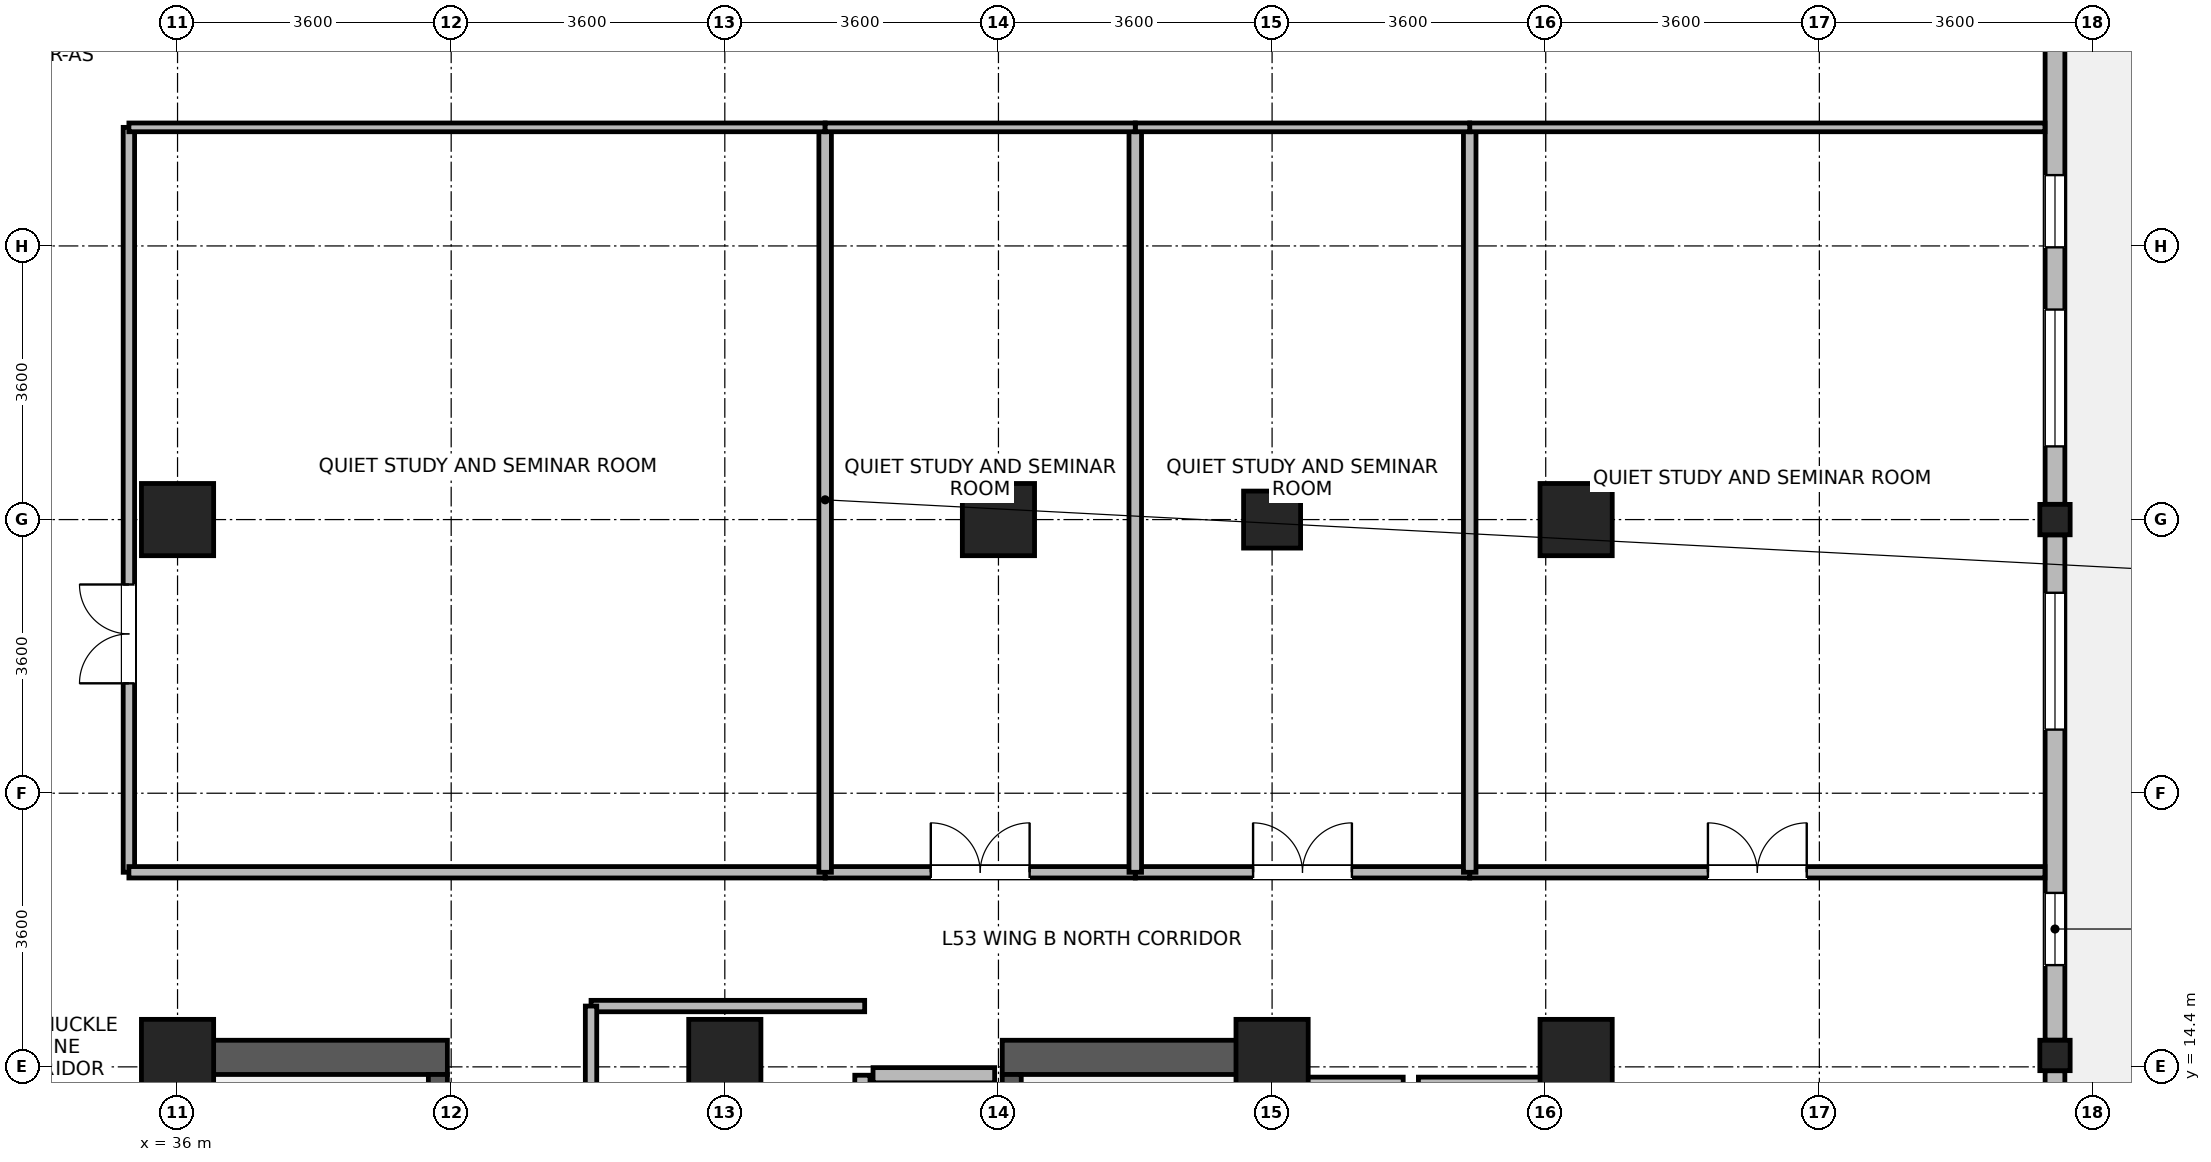
"""IFC4 building model, lengths in metres.
Left out: names, types, materials, properties, quantities, classifications, styles, units other than length and angle.
Written with IfcOpenShell. Run it as: python <this file> out.ifc"""

import sys

from ifc_helpers import new_model, si_unit, direction, frame, frame_2d, origin, origin_2d, place, context, subcontext, project, spatial, rectangle, i_section, extrude, source, transform, mapped, element, fill, save


model = new_model("IFC4")
c1 = context("Model", 3, precision=1e-05, world=origin(), true_north=direction((0.0, 1.0)))
c2 = subcontext(c1, "Body", "Model", "MODEL_VIEW")
j1 = project(units=[si_unit("LENGTHUNIT", "METRE"), si_unit("PLANEANGLEUNIT", "RADIAN")], contexts=[c1])
p1 = place(None, origin())
s1 = spatial("IfcSite", under=j1, at=p1, CompositionType="ELEMENT")
p2 = place(p1, origin())
s2 = spatial("IfcBuilding", under=s1, at=p2, CompositionType="ELEMENT")
p3 = place(p2, frame((0.0, 0.0, 209.2)))
s3 = spatial("IfcBuildingStorey", under=s2, at=p3, CompositionType="ELEMENT", Elevation=209.2)
for number, where, z_axis, x_axis in (
    (1, (36.125, 6.85, 0.0), (0.0, 0.0, 1.0), (0.0, 1.0, 0.0)),
    (2, (50.275, 6.85, 0.0), (0.0, 0.0, 1.0), (0.0, 1.0, 0.0)),
):
    element("IfcWall", number, at=place(p3, frame(where, z_axis=z_axis, x_axis=x_axis)), inside=s3, PredefinedType="SHEAR", context=c2, shape_type="SweptSolid", body=[
        extrude(rectangle(XDim=7.9, YDim=0.45, at=frame_2d((3.95, 0.0))), origin(), (0.0, 0.0, 1.0), 3.47),
    ])
for number, where, z_axis, x_axis in (
    (3, (36.35, 14.525, 0.0), (0.0, 0.0, 1.0), (1.0, 0.0, 0.0)),
    (4, (46.85, 14.525, 0.0), (0.0, 0.0, 1.0), (1.0, 0.0, 0.0)),
):
    element("IfcWall", number, at=place(p3, frame(where, z_axis=z_axis, x_axis=x_axis)), inside=s3, PredefinedType="SHEAR", context=c2, shape_type="SweptSolid", body=[
        extrude(rectangle(XDim=3.2, YDim=0.45, at=frame_2d((1.6, 0.0))), origin(), (0.0, 0.0, 1.0), 3.47),
    ])
p4 = place(p3, frame((39.425, 7.3, 0.0), z_axis=(0.0, 0.0, 1.0), x_axis=(0.0, 1.0, 0.0)))
e5 = element("IfcWall", 5, at=p4, inside=s3, PredefinedType="SHEAR", context=c2, shape_type="SweptSolid", body=[
    extrude(rectangle(XDim=7.0, YDim=0.25, at=frame_2d((3.5, 0.0))), origin(), (0.0, 0.0, 1.0), 3.47),
])
p5 = place(p4, frame((0.15, 0.0, 0.0)))
e6 = element("IfcOpeningElement", 6, at=p5, cuts=e5, PredefinedType="OPENING", context=c2, shape_type="SweptSolid", body=[
    extrude(rectangle(XDim=1.1, YDim=2.08, at=frame_2d((0.55, 1.04))), frame((0.0, 0.135, 0.0), z_axis=(0.0, -1.0, 0.0), x_axis=(1.0, 0.0, 0.0)), (0.0, 0.0, 1.0), 0.27),
])
p6 = place(p3, frame((46.975, 7.3, 0.0), z_axis=(0.0, 0.0, 1.0), x_axis=(0.0, 1.0, 0.0)))
e7 = element("IfcWall", 7, at=p6, inside=s3, PredefinedType="SHEAR", context=c2, shape_type="SweptSolid", body=[
    extrude(rectangle(XDim=7.0, YDim=0.25, at=frame_2d((3.5, 0.0))), origin(), (0.0, 0.0, 1.0), 3.47),
])
p7 = place(p6, frame((0.15, 0.0, 0.0)))
e8 = element("IfcOpeningElement", 8, at=p7, cuts=e7, PredefinedType="OPENING", context=c2, shape_type="SweptSolid", body=[
    extrude(rectangle(XDim=1.1, YDim=2.08, at=frame_2d((0.55, 1.04))), frame((0.0, 0.135, 0.0), z_axis=(0.0, -1.0, 0.0), x_axis=(1.0, 0.0, 0.0)), (0.0, 0.0, 1.0), 0.27),
])
m1 = source(origin(), c2, "Body", "SweptSolid", [
    extrude(rectangle(XDim=0.95, YDim=0.95, at=origin_2d()), origin(), (0.0, 0.0, 1.0), 3.7),
])
for number, where, z_axis, x_axis in (
    (9, (36.0, 21.6, 0.0), (0.0, 0.0, 1.0), (1.0, 0.0, 0.0)),
    (10, (46.8, 21.6, 0.0), (0.0, 0.0, 1.0), (1.0, 0.0, 0.0)),
    (11, (36.0, 14.55, 0.0), (0.0, 0.0, 1.0), (1.0, 0.0, 0.0)),
    (12, (43.2, 14.55, 0.0), (0.0, 0.0, 1.0), (1.0, 0.0, 0.0)),
    (13, (50.4, 14.55, 0.0), (0.0, 0.0, 1.0), (1.0, 0.0, 0.0)),
):
    element("IfcColumn", number, at=place(p3, frame(where, z_axis=z_axis, x_axis=x_axis)), inside=s3, PredefinedType="COLUMN", context=c2, shape_type="MappedRepresentation", body=[
        mapped(m1, transform((0.0, 0.0, 0.0), x_axis=(1.0, 0.0, 0.0), y_axis=(0.0, 1.0, 0.0), z_axis=(0.0, 0.0, 1.0), scale=1.0)),
    ])
m2 = source(origin(), c2, "Body", "SweptSolid", [
    extrude(rectangle(XDim=0.75, YDim=0.75, at=origin_2d()), origin(), (0.0, 0.0, 1.0), 3.7),
])
p8 = place(p3, frame((50.4, 21.6, 0.0), z_axis=(0.0, 0.0, 1.0), x_axis=(1.0, 0.0, 0.0)))
e14 = element("IfcColumn", 14, at=p8, inside=s3, PredefinedType="PILASTER", context=c2, shape_type="MappedRepresentation", body=[
    mapped(m2, transform((0.0, 0.0, 0.0), x_axis=(1.0, 0.0, 0.0), y_axis=(0.0, 1.0, 0.0), z_axis=(0.0, 0.0, 1.0), scale=1.0)),
])
for number, where, z_axis, x_axis in (
    (15, (54.4, 14.55, 0.0), (0.0, 0.0, 1.0), (1.0, 0.0, 0.0)),
    (16, (54.4, 21.6, 0.0), (0.0, 0.0, 1.0), (1.0, 0.0, 0.0)),
):
    element("IfcColumn", number, at=place(p3, frame(where, z_axis=z_axis, x_axis=x_axis)), inside=s3, PredefinedType="COLUMN", context=c2, shape_type="MappedRepresentation", body=[
        mapped(m1, transform((0.0, 0.0, 0.0), x_axis=(1.0, 0.0, 0.0), y_axis=(0.0, 1.0, 0.0), z_axis=(0.0, 0.0, 1.0), scale=1.0)),
    ])
m3 = source(origin(), c2, "Body", "SweptSolid", [
    extrude(i_section(OverallWidth=0.399, OverallDepth=0.4, WebThickness=0.017, FlangeThickness=0.023, FilletRadius=0.015, at=origin_2d()), origin(), (0.0, 0.0, 1.0), 3.7),
])
for number, where, z_axis, x_axis in (
    (17, (60.7, 14.55, 0.0), (0.0, 0.0, 1.0), (1.0, 0.0, 0.0)),
    (18, (60.7, 21.6, 0.0), (0.0, 0.0, 1.0), (1.0, 0.0, 0.0)),
):
    element("IfcColumn", number, at=place(p3, frame(where, z_axis=z_axis, x_axis=x_axis)), inside=s3, PredefinedType="COLUMN", context=c2, shape_type="MappedRepresentation", body=[
        mapped(m3, transform((0.0, 0.0, 0.0), x_axis=(1.0, 0.0, 0.0), y_axis=(0.0, 1.0, 0.0), z_axis=(0.0, 0.0, 1.0), scale=1.0)),
    ])
p9 = place(p3, frame((60.7, 14.349, 0.0), z_axis=(0.0, 0.0, 1.0), x_axis=(0.0, -1.0, 0.0)))
e19 = element("IfcWall", 19, at=p9, inside=s3, PredefinedType="STANDARD", context=c2, shape_type="SweptSolid", body=[
    extrude(rectangle(XDim=7.098, YDim=0.26, at=frame_2d((3.549, 0.0))), origin(), (0.0, 0.0, 1.0), 3.0),
])
p10 = place(p9, frame((2.799, 0.0, 0.0)))
e20 = element("IfcOpeningElement", 20, at=p10, cuts=e19, PredefinedType="OPENING", context=c2, shape_type="SweptSolid", body=[
    extrude(rectangle(XDim=1.5, YDim=2.15, at=frame_2d((0.75, 1.075))), frame((0.0, 0.14, 0.0), z_axis=(0.0, -1.0, 0.0), x_axis=(1.0, 0.0, 0.0)), (0.0, 0.0, 1.0), 0.28),
])
p11 = place(p3, frame((60.7, 21.399, 0.0), z_axis=(0.0, 0.0, 1.0), x_axis=(0.0, -1.0, 0.0)))
e21 = element("IfcWall", 21, at=p11, inside=s3, PredefinedType="STANDARD", context=c2, shape_type="SweptSolid", body=[
    extrude(rectangle(XDim=6.648, YDim=0.26, at=frame_2d((3.324, 0.0))), origin(), (0.0, 0.0, 1.0), 3.0),
])
p12 = place(p11, frame((0.762, 0.0, 0.85)))
e22 = element("IfcOpeningElement", 22, at=p12, cuts=e21, PredefinedType="OPENING", context=c2, shape_type="SweptSolid", body=[
    extrude(rectangle(XDim=1.8, YDim=1.85, at=frame_2d((0.9, 0.925))), frame((0.0, 0.14, 0.0), z_axis=(0.0, -1.0, 0.0), x_axis=(1.0, 0.0, 0.0)), (0.0, 0.0, 1.0), 0.28),
])
p13 = place(p11, frame((4.71, 0.0, 0.85)))
e23 = element("IfcOpeningElement", 23, at=p13, cuts=e21, PredefinedType="OPENING", context=c2, shape_type="SweptSolid", body=[
    extrude(rectangle(XDim=0.95, YDim=1.75, at=frame_2d((0.475, 0.875))), frame((0.0, 0.14, 0.0), z_axis=(0.0, -1.0, 0.0), x_axis=(1.0, 0.0, 0.0)), (0.0, 0.0, 1.0), 0.28),
])
p14 = place(p3, frame((60.7, 28.449, 0.0), z_axis=(0.0, 0.0, 1.0), x_axis=(0.0, -1.0, 0.0)))
e24 = element("IfcWall", 24, at=p14, inside=s3, PredefinedType="STANDARD", context=c2, shape_type="SweptSolid", body=[
    extrude(rectangle(XDim=6.648, YDim=0.26, at=frame_2d((3.324, 0.0))), origin(), (0.0, 0.0, 1.0), 3.0),
])
p15 = place(p14, frame((4.086, 0.0, 0.85)))
e25 = element("IfcOpeningElement", 25, at=p15, cuts=e24, PredefinedType="OPENING", context=c2, shape_type="SweptSolid", body=[
    extrude(rectangle(XDim=1.8, YDim=1.85, at=frame_2d((0.9, 0.925))), frame((0.0, 0.14, 0.0), z_axis=(0.0, -1.0, 0.0), x_axis=(1.0, 0.0, 0.0)), (0.0, 0.0, 1.0), 0.28),
])
p16 = place(p14, frame((2.317, 0.0, 0.85)))
e26 = element("IfcOpeningElement", 26, at=p16, cuts=e24, PredefinedType="OPENING", context=c2, shape_type="SweptSolid", body=[
    extrude(rectangle(XDim=0.95, YDim=1.75, at=frame_2d((0.475, 0.875))), frame((0.0, 0.14, 0.0), z_axis=(0.0, -1.0, 0.0), x_axis=(1.0, 0.0, 0.0)), (0.0, 0.0, 1.0), 0.28),
])
p17 = place(p3, frame((50.475, 14.165, 0.0), z_axis=(0.0, 0.0, 1.0), x_axis=(1.0, 0.0, 0.0)))
e27 = element("IfcWall", 27, at=p17, inside=s3, PredefinedType="PARTITIONING", context=c2, shape_type="SweptSolid", body=[
    extrude(rectangle(XDim=1.65, YDim=0.2, at=frame_2d((0.825, 0.0))), origin(), (0.0, 0.0, 1.0), 3.45),
])
p18 = place(p3, frame((52.325, 14.165, 0.0), z_axis=(0.0, 0.0, 1.0), x_axis=(1.0, 0.0, 0.0)))
e28 = element("IfcWall", 28, at=p18, inside=s3, PredefinedType="PARTITIONING", context=c2, shape_type="SweptSolid", body=[
    extrude(rectangle(XDim=1.65, YDim=0.2, at=frame_2d((0.825, 0.0))), origin(), (0.0, 0.0, 1.0), 3.45),
])
p19 = place(p3, frame((45.15, 14.29, 0.0), z_axis=(0.0, 0.0, 1.0), x_axis=(1.0, 0.0, 0.0)))
e29 = element("IfcWall", 29, at=p19, inside=s3, PredefinedType="PARTITIONING", context=c2, shape_type="SweptSolid", body=[
    extrude(rectangle(XDim=1.6, YDim=0.2, at=frame_2d((0.8, 0.0))), origin(), (0.0, 0.0, 1.0), 2.45),
])
p20 = place(p3, frame((45.01, 11.61, 0.0), z_axis=(0.0, 0.0, 1.0), x_axis=(0.0, 1.0, 0.0)))
e30 = element("IfcWall", 30, at=p20, inside=s3, PredefinedType="PARTITIONING", context=c2, shape_type="SweptSolid", body=[
    extrude(rectangle(XDim=2.68, YDim=0.2, at=frame_2d((1.34, 0.0))), origin(), (0.0, 0.0, 1.0), 3.45),
])
p21 = place(p3, frame((35.36, 16.96, 0.0), z_axis=(0.0, 0.0, 1.0), x_axis=(0.0, 1.0, 0.0)))
e31 = element("IfcWall", 31, at=p21, inside=s3, PredefinedType="PARTITIONING", context=c2, shape_type="SweptSolid", body=[
    extrude(rectangle(XDim=9.8, YDim=0.15, at=frame_2d((4.9, 0.0))), origin(), (0.0, 0.0, 1.0), 3.45),
])
p22 = place(p21, frame((2.486, 0.0, 0.0)))
e32 = element("IfcOpeningElement", 32, at=p22, cuts=e31, PredefinedType="OPENING", context=c2, shape_type="SweptSolid", body=[
    extrude(rectangle(XDim=1.3, YDim=2.12, at=frame_2d((0.65, 1.06))), frame((0.0, 0.085, 0.0), z_axis=(0.0, -1.0, 0.0), x_axis=(1.0, 0.0, 0.0)), (0.0, 0.0, 1.0), 0.17),
])
p23 = place(p3, frame((35.36, 16.96, 0.0), z_axis=(0.0, 0.0, 1.0), x_axis=(1.0, 0.0, 0.0)))
e33 = element("IfcWall", 33, at=p23, inside=s3, PredefinedType="PARTITIONING", context=c2, shape_type="SweptSolid", body=[
    extrude(rectangle(XDim=9.16, YDim=0.15, at=frame_2d((4.58, 0.0))), origin(), (0.0, 0.0, 1.0), 3.45),
])
p24 = place(p3, frame((53.0, 16.96, 0.0), z_axis=(0.0, 0.0, 1.0), x_axis=(1.0, 0.0, 0.0)))
e34 = element("IfcWall", 34, at=p24, inside=s3, PredefinedType="PARTITIONING", context=c2, shape_type="SweptSolid", body=[
    extrude(rectangle(XDim=7.568, YDim=0.15, at=frame_2d((3.784, 0.0))), origin(), (0.0, 0.0, 1.0), 3.45),
])
p25 = place(p24, frame((3.134, 0.0, 0.0)))
e35 = element("IfcOpeningElement", 35, at=p25, cuts=e34, PredefinedType="OPENING", context=c2, shape_type="SweptSolid", body=[
    extrude(rectangle(XDim=1.3, YDim=2.12, at=frame_2d((0.65, 1.06))), frame((0.0, 0.085, 0.0), z_axis=(0.0, -1.0, 0.0), x_axis=(1.0, 0.0, 0.0)), (0.0, 0.0, 1.0), 0.17),
])
p26 = place(p3, frame((48.6, 16.96, 0.0), z_axis=(0.0, 0.0, 1.0), x_axis=(1.0, 0.0, 0.0)))
e36 = element("IfcWall", 36, at=p26, inside=s3, PredefinedType="PARTITIONING", context=c2, shape_type="SweptSolid", body=[
    extrude(rectangle(XDim=4.4, YDim=0.15, at=frame_2d((2.2, 0.0))), origin(), (0.0, 0.0, 1.0), 3.45),
])
p27 = place(p26, frame((1.55, 0.0, 0.0)))
e37 = element("IfcOpeningElement", 37, at=p27, cuts=e36, PredefinedType="OPENING", context=c2, shape_type="SweptSolid", body=[
    extrude(rectangle(XDim=1.3, YDim=2.12, at=frame_2d((0.65, 1.06))), frame((0.0, 0.085, 0.0), z_axis=(0.0, -1.0, 0.0), x_axis=(1.0, 0.0, 0.0)), (0.0, 0.0, 1.0), 0.17),
])
p28 = place(p3, frame((44.52, 16.96, 0.0), z_axis=(0.0, 0.0, 1.0), x_axis=(1.0, 0.0, 0.0)))
e38 = element("IfcWall", 38, at=p28, inside=s3, PredefinedType="PARTITIONING", context=c2, shape_type="SweptSolid", body=[
    extrude(rectangle(XDim=4.08, YDim=0.15, at=frame_2d((2.04, 0.0))), origin(), (0.0, 0.0, 1.0), 3.45),
])
p29 = place(p28, frame((1.39, 0.0, 0.0)))
e39 = element("IfcOpeningElement", 39, at=p29, cuts=e38, PredefinedType="OPENING", context=c2, shape_type="SweptSolid", body=[
    extrude(rectangle(XDim=1.3, YDim=2.12, at=frame_2d((0.65, 1.06))), frame((0.0, 0.085, 0.0), z_axis=(0.0, -1.0, 0.0), x_axis=(1.0, 0.0, 0.0)), (0.0, 0.0, 1.0), 0.17),
])
p30 = place(p3, frame((41.44, 15.2, 0.0), z_axis=(0.0, 0.0, 1.0), x_axis=(1.0, 0.0, 0.0)))
e40 = element("IfcWall", 40, at=p30, inside=s3, PredefinedType="PARTITIONING", context=c2, shape_type="SweptSolid", body=[
    extrude(rectangle(XDim=3.6, YDim=0.15, at=frame_2d((1.8, 0.0))), origin(), (0.0, 0.0, 1.0), 3.45),
])
p31 = place(p3, frame((41.44, 11.64, 0.0), z_axis=(0.0, 0.0, 1.0), x_axis=(0.0, 1.0, 0.0)))
e41 = element("IfcWall", 41, at=p31, inside=s3, PredefinedType="PARTITIONING", context=c2, shape_type="SweptSolid", body=[
    extrude(rectangle(XDim=3.56, YDim=0.15, at=frame_2d((1.78, 0.0))), origin(), (0.0, 0.0, 1.0), 3.45),
])
for number, where, z_axis, x_axis in (
    (42, (44.52, 16.96, 0.0), (0.0, 0.0, 1.0), (0.0, 1.0, 0.0)),
    (43, (48.6, 16.96, 0.0), (0.0, 0.0, 1.0), (0.0, 1.0, 0.0)),
    (44, (53.0, 16.96, 0.0), (0.0, 0.0, 1.0), (0.0, 1.0, 0.0)),
):
    element("IfcWall", number, at=place(p3, frame(where, z_axis=z_axis, x_axis=x_axis)), inside=s3, PredefinedType="PARTITIONING", context=c2, shape_type="SweptSolid", body=[
        extrude(rectangle(XDim=9.8, YDim=0.165, at=frame_2d((4.9, 0.0))), origin(), (0.0, 0.0, 1.0), 3.45),
    ])
p32 = place(p3, frame((35.36, 26.76, 0.0), z_axis=(0.0, 0.0, 1.0), x_axis=(1.0, 0.0, 0.0)))
e45 = element("IfcWall", 45, at=p32, inside=s3, PredefinedType="PARTITIONING", context=c2, shape_type="SweptSolid", body=[
    extrude(rectangle(XDim=9.16, YDim=0.115, at=frame_2d((4.58, 0.0))), origin(), (0.0, 0.0, 1.0), 3.45),
])
p33 = place(p3, frame((53.0, 26.76, 0.0), z_axis=(0.0, 0.0, 1.0), x_axis=(1.0, 0.0, 0.0)))
e46 = element("IfcWall", 46, at=p33, inside=s3, PredefinedType="PARTITIONING", context=c2, shape_type="SweptSolid", body=[
    extrude(rectangle(XDim=7.568, YDim=0.115, at=frame_2d((3.784, 0.0))), origin(), (0.0, 0.0, 1.0), 3.45),
])
p34 = place(p3, frame((48.6, 26.76, 0.0), z_axis=(0.0, 0.0, 1.0), x_axis=(1.0, 0.0, 0.0)))
e47 = element("IfcWall", 47, at=p34, inside=s3, PredefinedType="PARTITIONING", context=c2, shape_type="SweptSolid", body=[
    extrude(rectangle(XDim=4.4, YDim=0.115, at=frame_2d((2.2, 0.0))), origin(), (0.0, 0.0, 1.0), 3.45),
])
p35 = place(p3, frame((44.52, 26.76, 0.0), z_axis=(0.0, 0.0, 1.0), x_axis=(1.0, 0.0, 0.0)))
e48 = element("IfcWall", 48, at=p35, inside=s3, PredefinedType="PARTITIONING", context=c2, shape_type="SweptSolid", body=[
    extrude(rectangle(XDim=4.08, YDim=0.115, at=frame_2d((2.04, 0.0))), origin(), (0.0, 0.0, 1.0), 3.45),
])
p36 = place(p12, origin())
e49 = element("IfcWindow", 49, at=p36, inside=s3, PartitioningType="SINGLE_PANEL", PredefinedType="WINDOW", context=c2, shape_type="SweptSolid", body=[
    extrude(rectangle(XDim=1.8, YDim=1.85, at=frame_2d((0.9, 0.925))), frame((0.0, 0.03, 0.0), z_axis=(0.0, -1.0, 0.0), x_axis=(1.0, 0.0, 0.0)), (0.0, 0.0, 1.0), 0.06),
])
fill(e22, e49)
p37 = place(p13, origin())
e50 = element("IfcWindow", 50, at=p37, inside=s3, PartitioningType="SINGLE_PANEL", PredefinedType="WINDOW", context=c2, shape_type="SweptSolid", body=[
    extrude(rectangle(XDim=0.95, YDim=1.75, at=frame_2d((0.475, 0.875))), frame((0.0, 0.03, 0.0), z_axis=(0.0, -1.0, 0.0), x_axis=(1.0, 0.0, 0.0)), (0.0, 0.0, 1.0), 0.06),
])
fill(e23, e50)
p38 = place(p15, origin())
e51 = element("IfcWindow", 51, at=p38, inside=s3, PartitioningType="SINGLE_PANEL", PredefinedType="WINDOW", context=c2, shape_type="SweptSolid", body=[
    extrude(rectangle(XDim=1.8, YDim=1.85, at=frame_2d((0.9, 0.925))), frame((0.0, 0.03, 0.0), z_axis=(0.0, -1.0, 0.0), x_axis=(1.0, 0.0, 0.0)), (0.0, 0.0, 1.0), 0.06),
])
fill(e25, e51)
p39 = place(p16, origin())
e52 = element("IfcWindow", 52, at=p39, inside=s3, PartitioningType="SINGLE_PANEL", PredefinedType="WINDOW", context=c2, shape_type="SweptSolid", body=[
    extrude(rectangle(XDim=0.95, YDim=1.75, at=frame_2d((0.475, 0.875))), frame((0.0, 0.03, 0.0), z_axis=(0.0, -1.0, 0.0), x_axis=(1.0, 0.0, 0.0)), (0.0, 0.0, 1.0), 0.06),
])
fill(e26, e52)
p40 = place(p22, origin())
e53 = element("IfcDoor", 53, at=p40, inside=s3, OperationType="DOUBLE_DOOR_SINGLE_SWING", PredefinedType="DOOR", context=c2, shape_type="SweptSolid", body=[
    extrude(rectangle(XDim=1.3, YDim=2.12, at=frame_2d((0.65, 1.06))), frame((0.0, 0.025, 0.0), z_axis=(0.0, -1.0, 0.0), x_axis=(1.0, 0.0, 0.0)), (0.0, 0.0, 1.0), 0.05),
])
fill(e32, e53)
p41 = place(p25, origin())
e54 = element("IfcDoor", 54, at=p41, inside=s3, OperationType="DOUBLE_DOOR_SINGLE_SWING", PredefinedType="DOOR", context=c2, shape_type="SweptSolid", body=[
    extrude(rectangle(XDim=1.3, YDim=2.12, at=frame_2d((0.65, 1.06))), frame((0.0, 0.025, 0.0), z_axis=(0.0, -1.0, 0.0), x_axis=(1.0, 0.0, 0.0)), (0.0, 0.0, 1.0), 0.05),
])
fill(e35, e54)
p42 = place(p27, origin())
e55 = element("IfcDoor", 55, at=p42, inside=s3, OperationType="DOUBLE_DOOR_SINGLE_SWING", PredefinedType="DOOR", context=c2, shape_type="SweptSolid", body=[
    extrude(rectangle(XDim=1.3, YDim=2.12, at=frame_2d((0.65, 1.06))), frame((0.0, 0.025, 0.0), z_axis=(0.0, -1.0, 0.0), x_axis=(1.0, 0.0, 0.0)), (0.0, 0.0, 1.0), 0.05),
])
fill(e37, e55)
p43 = place(p29, origin())
e56 = element("IfcDoor", 56, at=p43, inside=s3, OperationType="DOUBLE_DOOR_SINGLE_SWING", PredefinedType="DOOR", context=c2, shape_type="SweptSolid", body=[
    extrude(rectangle(XDim=1.3, YDim=2.12, at=frame_2d((0.65, 1.06))), frame((0.0, 0.025, 0.0), z_axis=(0.0, -1.0, 0.0), x_axis=(1.0, 0.0, 0.0)), (0.0, 0.0, 1.0), 0.05),
])
fill(e39, e56)
save(model, sys.argv[1])
